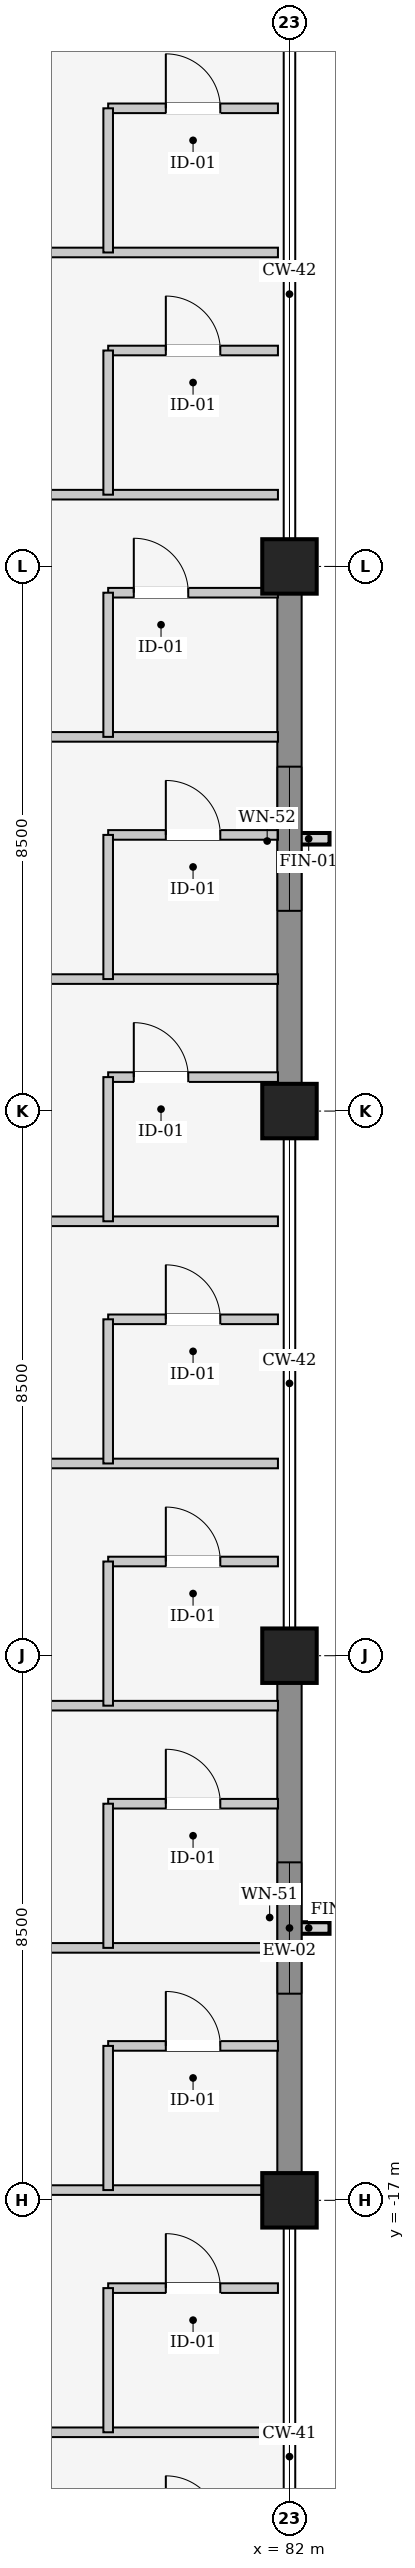
"""IFC4 building model, lengths in metres.
Left out: names, types, materials, properties, quantities, classifications, styles, units other than length and angle.
Written with IfcOpenShell. Run it as: python <this file> out.ifc"""

import sys

from ifc_helpers import new_model, si_unit, direction, frame, frame_2d, origin, origin_2d, place, context, subcontext, project, spatial, rectangle, extrude, element, fill, save


model = new_model("IFC4")
c1 = context("Model", 3, precision=1e-05, world=origin(), true_north=direction((0.0, 1.0)))
c2 = subcontext(c1, "Body", "Model", "MODEL_VIEW")
j1 = project(units=[si_unit("LENGTHUNIT", "METRE"), si_unit("PLANEANGLEUNIT", "RADIAN")], contexts=[c1])
p1 = place(None, origin())
s1 = spatial("IfcSite", under=j1, at=p1, CompositionType="ELEMENT")
p2 = place(p1, origin())
s2 = spatial("IfcBuilding", under=s1, at=p2, CompositionType="ELEMENT")
p3 = place(p2, frame((0.0, 0.0, 11.4)))
s3 = spatial("IfcBuildingStorey", under=s2, at=p3, CompositionType="ELEMENT", Elevation=11.4)
for number, where, z_axis, x_axis in (
    (1, (82.0, -17.0, 0.0), (0.0, 0.0, 1.0), (1.0, 0.0, 0.0)),
    (2, (82.0, -8.5, 0.0), (0.0, 0.0, 1.0), (1.0, 0.0, 0.0)),
    (3, (82.0, 0.0, 0.0), (0.0, 0.0, 1.0), (1.0, 0.0, 0.0)),
    (4, (82.0, 8.5, 0.0), (0.0, 0.0, 1.0), (1.0, 0.0, 0.0)),
):
    element("IfcColumn", number, at=place(p3, frame(where, z_axis=z_axis, x_axis=x_axis)), inside=s3, PredefinedType="COLUMN", context=c2, shape_type="SweptSolid", body=[
        extrude(rectangle(XDim=0.85, YDim=0.85, at=origin_2d()), origin(), (0.0, 0.0, 1.0), 4.8),
    ])
p4 = place(p3, frame((82.0, -8.907, 0.0), z_axis=(0.0, 0.0, 1.0), x_axis=(0.0, -1.0, 0.0)))
e5 = element("IfcWall", 5, at=p4, inside=s3, PredefinedType="SOLIDWALL", context=c2, shape_type="SweptSolid", body=[
    extrude(rectangle(XDim=7.686, YDim=0.38, at=frame_2d((3.843, 0.0))), origin(), (0.0, 0.0, 1.0), 3.76),
])
p5 = place(p4, frame((2.818, 0.0, 0.9)))
e6 = element("IfcOpeningElement", 6, at=p5, cuts=e5, PredefinedType="OPENING", context=c2, shape_type="SweptSolid", body=[
    extrude(rectangle(XDim=2.05, YDim=2.5, at=frame_2d((1.025, 1.25))), frame((0.0, 0.2, 0.0), z_axis=(0.0, -1.0, 0.0), x_axis=(1.0, 0.0, 0.0)), (0.0, 0.0, 1.0), 0.4),
])
p6 = place(p3, frame((82.0, 8.093, 0.0), z_axis=(0.0, 0.0, 1.0), x_axis=(0.0, -1.0, 0.0)))
e7 = element("IfcWall", 7, at=p6, inside=s3, PredefinedType="SOLIDWALL", context=c2, shape_type="SweptSolid", body=[
    extrude(rectangle(XDim=7.686, YDim=0.38, at=frame_2d((3.843, 0.0))), origin(), (0.0, 0.0, 1.0), 3.76),
])
p7 = place(p6, frame((2.718, 0.0, 0.9)))
e8 = element("IfcOpeningElement", 8, at=p7, cuts=e7, PredefinedType="OPENING", context=c2, shape_type="SweptSolid", body=[
    extrude(rectangle(XDim=2.25, YDim=2.5, at=frame_2d((1.125, 1.25))), frame((0.0, 0.2, 0.0), z_axis=(0.0, -1.0, 0.0), x_axis=(1.0, 0.0, 0.0)), (0.0, 0.0, 1.0), 0.4),
])
p8 = place(p3, frame((70.2, -20.62, 0.0), z_axis=(0.0, 0.0, 1.0), x_axis=(1.0, 0.0, 0.0)))
e9 = element("IfcWall", 9, at=p8, inside=s3, PredefinedType="PARTITIONING", context=c2, shape_type="SweptSolid", body=[
    extrude(rectangle(XDim=11.62, YDim=0.15, at=frame_2d((5.81, 0.0))), origin(), (0.0, 0.0, 1.0), 3.845),
])
p9 = place(p3, frame((79.17, -18.37, 0.0), z_axis=(0.0, 0.0, 1.0), x_axis=(1.0, 0.0, 0.0)))
e10 = element("IfcWall", 10, at=p9, inside=s3, PredefinedType="PARTITIONING", context=c2, shape_type="SweptSolid", body=[
    extrude(rectangle(XDim=2.65, YDim=0.15, at=frame_2d((1.325, 0.0))), origin(), (0.0, 0.0, 1.0), 3.845),
])
p10 = place(p9, frame((0.9, 0.0, 0.0)))
e11 = element("IfcOpeningElement", 11, at=p10, cuts=e10, PredefinedType="OPENING", context=c2, shape_type="SweptSolid", body=[
    extrude(rectangle(XDim=0.85, YDim=2.15, at=frame_2d((0.425, 1.075))), frame((0.0, 0.085, 0.0), z_axis=(0.0, -1.0, 0.0), x_axis=(1.0, 0.0, 0.0)), (0.0, 0.0, 1.0), 0.17),
])
p11 = place(p3, frame((79.17, -20.62, 0.0), z_axis=(0.0, 0.0, 1.0), x_axis=(0.0, 1.0, 0.0)))
e12 = element("IfcWall", 12, at=p11, inside=s3, PredefinedType="PARTITIONING", context=c2, shape_type="SweptSolid", body=[
    extrude(rectangle(XDim=2.25, YDim=0.15, at=frame_2d((1.125, 0.0))), origin(), (0.0, 0.0, 1.0), 4.44),
])
p12 = place(p3, frame((70.2, -16.84, 0.0), z_axis=(0.0, 0.0, 1.0), x_axis=(1.0, 0.0, 0.0)))
e13 = element("IfcWall", 13, at=p12, inside=s3, PredefinedType="PARTITIONING", context=c2, shape_type="SweptSolid", body=[
    extrude(rectangle(XDim=11.62, YDim=0.15, at=frame_2d((5.81, 0.0))), origin(), (0.0, 0.0, 1.0), 3.545),
])
p13 = place(p3, frame((79.17, -14.59, 0.0), z_axis=(0.0, 0.0, 1.0), x_axis=(1.0, 0.0, 0.0)))
e14 = element("IfcWall", 14, at=p13, inside=s3, PredefinedType="PARTITIONING", context=c2, shape_type="SweptSolid", body=[
    extrude(rectangle(XDim=2.65, YDim=0.15, at=frame_2d((1.325, 0.0))), origin(), (0.0, 0.0, 1.0), 3.845),
])
p14 = place(p13, frame((0.9, 0.0, 0.0)))
e15 = element("IfcOpeningElement", 15, at=p14, cuts=e14, PredefinedType="OPENING", context=c2, shape_type="SweptSolid", body=[
    extrude(rectangle(XDim=0.85, YDim=2.15, at=frame_2d((0.425, 1.075))), frame((0.0, 0.085, 0.0), z_axis=(0.0, -1.0, 0.0), x_axis=(1.0, 0.0, 0.0)), (0.0, 0.0, 1.0), 0.17),
])
p15 = place(p3, frame((79.17, -16.84, 0.0), z_axis=(0.0, 0.0, 1.0), x_axis=(0.0, 1.0, 0.0)))
e16 = element("IfcWall", 16, at=p15, inside=s3, PredefinedType="PARTITIONING", context=c2, shape_type="SweptSolid", body=[
    extrude(rectangle(XDim=2.25, YDim=0.15, at=frame_2d((1.125, 0.0))), origin(), (0.0, 0.0, 1.0), 3.745),
])
p16 = place(p3, frame((70.2, -13.06, 0.0), z_axis=(0.0, 0.0, 1.0), x_axis=(1.0, 0.0, 0.0)))
e17 = element("IfcWall", 17, at=p16, inside=s3, PredefinedType="PARTITIONING", context=c2, shape_type="SweptSolid", body=[
    extrude(rectangle(XDim=11.62, YDim=0.15, at=frame_2d((5.81, 0.0))), origin(), (0.0, 0.0, 1.0), 3.845),
])
p17 = place(p3, frame((79.17, -10.81, 0.0), z_axis=(0.0, 0.0, 1.0), x_axis=(1.0, 0.0, 0.0)))
e18 = element("IfcWall", 18, at=p17, inside=s3, PredefinedType="PARTITIONING", context=c2, shape_type="SweptSolid", body=[
    extrude(rectangle(XDim=2.65, YDim=0.15, at=frame_2d((1.325, 0.0))), origin(), (0.0, 0.0, 1.0), 3.845),
])
p18 = place(p17, frame((0.9, 0.0, 0.0)))
e19 = element("IfcOpeningElement", 19, at=p18, cuts=e18, PredefinedType="OPENING", context=c2, shape_type="SweptSolid", body=[
    extrude(rectangle(XDim=0.85, YDim=2.15, at=frame_2d((0.425, 1.075))), frame((0.0, 0.085, 0.0), z_axis=(0.0, -1.0, 0.0), x_axis=(1.0, 0.0, 0.0)), (0.0, 0.0, 1.0), 0.17),
])
p19 = place(p3, frame((79.17, -13.06, 0.0), z_axis=(0.0, 0.0, 1.0), x_axis=(0.0, 1.0, 0.0)))
e20 = element("IfcWall", 20, at=p19, inside=s3, PredefinedType="PARTITIONING", context=c2, shape_type="SweptSolid", body=[
    extrude(rectangle(XDim=2.25, YDim=0.15, at=frame_2d((1.125, 0.0))), origin(), (0.0, 0.0, 1.0), 4.14),
])
p20 = place(p3, frame((70.2, -9.28, 0.0), z_axis=(0.0, 0.0, 1.0), x_axis=(1.0, 0.0, 0.0)))
e21 = element("IfcWall", 21, at=p20, inside=s3, PredefinedType="PARTITIONING", context=c2, shape_type="SweptSolid", body=[
    extrude(rectangle(XDim=11.62, YDim=0.15, at=frame_2d((5.81, 0.0))), origin(), (0.0, 0.0, 1.0), 3.845),
])
p21 = place(p3, frame((79.17, -7.03, 0.0), z_axis=(0.0, 0.0, 1.0), x_axis=(1.0, 0.0, 0.0)))
e22 = element("IfcWall", 22, at=p21, inside=s3, PredefinedType="PARTITIONING", context=c2, shape_type="SweptSolid", body=[
    extrude(rectangle(XDim=2.65, YDim=0.15, at=frame_2d((1.325, 0.0))), origin(), (0.0, 0.0, 1.0), 3.845),
])
p22 = place(p21, frame((0.9, 0.0, 0.0)))
e23 = element("IfcOpeningElement", 23, at=p22, cuts=e22, PredefinedType="OPENING", context=c2, shape_type="SweptSolid", body=[
    extrude(rectangle(XDim=0.85, YDim=2.15, at=frame_2d((0.425, 1.075))), frame((0.0, 0.085, 0.0), z_axis=(0.0, -1.0, 0.0), x_axis=(1.0, 0.0, 0.0)), (0.0, 0.0, 1.0), 0.17),
])
p23 = place(p3, frame((79.17, -9.28, 0.0), z_axis=(0.0, 0.0, 1.0), x_axis=(0.0, 1.0, 0.0)))
e24 = element("IfcWall", 24, at=p23, inside=s3, PredefinedType="PARTITIONING", context=c2, shape_type="SweptSolid", body=[
    extrude(rectangle(XDim=2.25, YDim=0.15, at=frame_2d((1.125, 0.0))), origin(), (0.0, 0.0, 1.0), 3.745),
])
p24 = place(p3, frame((70.2, -5.5, 0.0), z_axis=(0.0, 0.0, 1.0), x_axis=(1.0, 0.0, 0.0)))
e25 = element("IfcWall", 25, at=p24, inside=s3, PredefinedType="PARTITIONING", context=c2, shape_type="SweptSolid", body=[
    extrude(rectangle(XDim=11.62, YDim=0.15, at=frame_2d((5.81, 0.0))), origin(), (0.0, 0.0, 1.0), 3.845),
])
p25 = place(p3, frame((79.17, -3.25, 0.0), z_axis=(0.0, 0.0, 1.0), x_axis=(1.0, 0.0, 0.0)))
e26 = element("IfcWall", 26, at=p25, inside=s3, PredefinedType="PARTITIONING", context=c2, shape_type="SweptSolid", body=[
    extrude(rectangle(XDim=2.65, YDim=0.15, at=frame_2d((1.325, 0.0))), origin(), (0.0, 0.0, 1.0), 3.845),
])
p26 = place(p25, frame((0.9, 0.0, 0.0)))
e27 = element("IfcOpeningElement", 27, at=p26, cuts=e26, PredefinedType="OPENING", context=c2, shape_type="SweptSolid", body=[
    extrude(rectangle(XDim=0.85, YDim=2.15, at=frame_2d((0.425, 1.075))), frame((0.0, 0.085, 0.0), z_axis=(0.0, -1.0, 0.0), x_axis=(1.0, 0.0, 0.0)), (0.0, 0.0, 1.0), 0.17),
])
p27 = place(p3, frame((79.17, -5.5, 0.0), z_axis=(0.0, 0.0, 1.0), x_axis=(0.0, 1.0, 0.0)))
e28 = element("IfcWall", 28, at=p27, inside=s3, PredefinedType="PARTITIONING", context=c2, shape_type="SweptSolid", body=[
    extrude(rectangle(XDim=2.25, YDim=0.15, at=frame_2d((1.125, 0.0))), origin(), (0.0, 0.0, 1.0), 4.14),
])
p28 = place(p3, frame((70.2, -1.72, 0.0), z_axis=(0.0, 0.0, 1.0), x_axis=(1.0, 0.0, 0.0)))
e29 = element("IfcWall", 29, at=p28, inside=s3, PredefinedType="PARTITIONING", context=c2, shape_type="SweptSolid", body=[
    extrude(rectangle(XDim=11.62, YDim=0.15, at=frame_2d((5.81, 0.0))), origin(), (0.0, 0.0, 1.0), 3.845),
])
p29 = place(p3, frame((79.17, 0.53, 0.0), z_axis=(0.0, 0.0, 1.0), x_axis=(1.0, 0.0, 0.0)))
e30 = element("IfcWall", 30, at=p29, inside=s3, PredefinedType="PARTITIONING", context=c2, shape_type="SweptSolid", body=[
    extrude(rectangle(XDim=2.65, YDim=0.15, at=frame_2d((1.325, 0.0))), origin(), (0.0, 0.0, 1.0), 3.845),
])
p30 = place(p29, frame((0.4, 0.0, 0.0)))
e31 = element("IfcOpeningElement", 31, at=p30, cuts=e30, PredefinedType="OPENING", context=c2, shape_type="SweptSolid", body=[
    extrude(rectangle(XDim=0.85, YDim=2.15, at=frame_2d((0.425, 1.075))), frame((0.0, 0.085, 0.0), z_axis=(0.0, -1.0, 0.0), x_axis=(1.0, 0.0, 0.0)), (0.0, 0.0, 1.0), 0.17),
])
p31 = place(p3, frame((79.17, -1.72, 0.0), z_axis=(0.0, 0.0, 1.0), x_axis=(0.0, 1.0, 0.0)))
e32 = element("IfcWall", 32, at=p31, inside=s3, PredefinedType="PARTITIONING", context=c2, shape_type="SweptSolid", body=[
    extrude(rectangle(XDim=2.25, YDim=0.15, at=frame_2d((1.125, 0.0))), origin(), (0.0, 0.0, 1.0), 3.745),
])
p32 = place(p3, frame((70.2, 2.06, 0.0), z_axis=(0.0, 0.0, 1.0), x_axis=(1.0, 0.0, 0.0)))
e33 = element("IfcWall", 33, at=p32, inside=s3, PredefinedType="PARTITIONING", context=c2, shape_type="SweptSolid", body=[
    extrude(rectangle(XDim=11.62, YDim=0.15, at=frame_2d((5.81, 0.0))), origin(), (0.0, 0.0, 1.0), 3.845),
])
p33 = place(p3, frame((79.17, 4.31, 0.0), z_axis=(0.0, 0.0, 1.0), x_axis=(1.0, 0.0, 0.0)))
e34 = element("IfcWall", 34, at=p33, inside=s3, PredefinedType="PARTITIONING", context=c2, shape_type="SweptSolid", body=[
    extrude(rectangle(XDim=2.65, YDim=0.15, at=frame_2d((1.325, 0.0))), origin(), (0.0, 0.0, 1.0), 3.845),
])
p34 = place(p33, frame((0.9, 0.0, 0.0)))
e35 = element("IfcOpeningElement", 35, at=p34, cuts=e34, PredefinedType="OPENING", context=c2, shape_type="SweptSolid", body=[
    extrude(rectangle(XDim=0.85, YDim=2.15, at=frame_2d((0.425, 1.075))), frame((0.0, 0.085, 0.0), z_axis=(0.0, -1.0, 0.0), x_axis=(1.0, 0.0, 0.0)), (0.0, 0.0, 1.0), 0.17),
])
p35 = place(p3, frame((79.17, 2.06, 0.0), z_axis=(0.0, 0.0, 1.0), x_axis=(0.0, 1.0, 0.0)))
e36 = element("IfcWall", 36, at=p35, inside=s3, PredefinedType="PARTITIONING", context=c2, shape_type="SweptSolid", body=[
    extrude(rectangle(XDim=2.25, YDim=0.15, at=frame_2d((1.125, 0.0))), origin(), (0.0, 0.0, 1.0), 4.14),
])
p36 = place(p3, frame((70.2, 5.84, 0.0), z_axis=(0.0, 0.0, 1.0), x_axis=(1.0, 0.0, 0.0)))
e37 = element("IfcWall", 37, at=p36, inside=s3, PredefinedType="PARTITIONING", context=c2, shape_type="SweptSolid", body=[
    extrude(rectangle(XDim=11.62, YDim=0.15, at=frame_2d((5.81, 0.0))), origin(), (0.0, 0.0, 1.0), 3.845),
])
p37 = place(p3, frame((79.17, 8.09, 0.0), z_axis=(0.0, 0.0, 1.0), x_axis=(1.0, 0.0, 0.0)))
e38 = element("IfcWall", 38, at=p37, inside=s3, PredefinedType="PARTITIONING", context=c2, shape_type="SweptSolid", body=[
    extrude(rectangle(XDim=2.65, YDim=0.15, at=frame_2d((1.325, 0.0))), origin(), (0.0, 0.0, 1.0), 3.745),
])
p38 = place(p37, frame((0.4, 0.0, 0.0)))
e39 = element("IfcOpeningElement", 39, at=p38, cuts=e38, PredefinedType="OPENING", context=c2, shape_type="SweptSolid", body=[
    extrude(rectangle(XDim=0.85, YDim=2.15, at=frame_2d((0.425, 1.075))), frame((0.0, 0.085, 0.0), z_axis=(0.0, -1.0, 0.0), x_axis=(1.0, 0.0, 0.0)), (0.0, 0.0, 1.0), 0.17),
])
p39 = place(p3, frame((79.17, 5.84, 0.0), z_axis=(0.0, 0.0, 1.0), x_axis=(0.0, 1.0, 0.0)))
e40 = element("IfcWall", 40, at=p39, inside=s3, PredefinedType="PARTITIONING", context=c2, shape_type="SweptSolid", body=[
    extrude(rectangle(XDim=2.25, YDim=0.15, at=frame_2d((1.125, 0.0))), origin(), (0.0, 0.0, 1.0), 3.745),
])
p40 = place(p3, frame((70.2, 9.62, 0.0), z_axis=(0.0, 0.0, 1.0), x_axis=(1.0, 0.0, 0.0)))
e41 = element("IfcWall", 41, at=p40, inside=s3, PredefinedType="PARTITIONING", context=c2, shape_type="SweptSolid", body=[
    extrude(rectangle(XDim=11.62, YDim=0.15, at=frame_2d((5.81, 0.0))), origin(), (0.0, 0.0, 1.0), 3.845),
])
p41 = place(p3, frame((79.17, 11.87, 0.0), z_axis=(0.0, 0.0, 1.0), x_axis=(1.0, 0.0, 0.0)))
e42 = element("IfcWall", 42, at=p41, inside=s3, PredefinedType="PARTITIONING", context=c2, shape_type="SweptSolid", body=[
    extrude(rectangle(XDim=2.65, YDim=0.15, at=frame_2d((1.325, 0.0))), origin(), (0.0, 0.0, 1.0), 3.845),
])
p42 = place(p41, frame((0.9, 0.0, 0.0)))
e43 = element("IfcOpeningElement", 43, at=p42, cuts=e42, PredefinedType="OPENING", context=c2, shape_type="SweptSolid", body=[
    extrude(rectangle(XDim=0.85, YDim=2.15, at=frame_2d((0.425, 1.075))), frame((0.0, 0.085, 0.0), z_axis=(0.0, -1.0, 0.0), x_axis=(1.0, 0.0, 0.0)), (0.0, 0.0, 1.0), 0.17),
])
p43 = place(p3, frame((79.17, 9.62, 0.0), z_axis=(0.0, 0.0, 1.0), x_axis=(0.0, 1.0, 0.0)))
e44 = element("IfcWall", 44, at=p43, inside=s3, PredefinedType="PARTITIONING", context=c2, shape_type="SweptSolid", body=[
    extrude(rectangle(XDim=2.25, YDim=0.15, at=frame_2d((1.125, 0.0))), origin(), (0.0, 0.0, 1.0), 4.44),
])
p44 = place(p3, frame((70.2, 13.4, 0.0), z_axis=(0.0, 0.0, 1.0), x_axis=(1.0, 0.0, 0.0)))
e45 = element("IfcWall", 45, at=p44, inside=s3, PredefinedType="PARTITIONING", context=c2, shape_type="SweptSolid", body=[
    extrude(rectangle(XDim=11.62, YDim=0.15, at=frame_2d((5.81, 0.0))), origin(), (0.0, 0.0, 1.0), 3.845),
])
p45 = place(p3, frame((79.17, 15.65, 0.0), z_axis=(0.0, 0.0, 1.0), x_axis=(1.0, 0.0, 0.0)))
e46 = element("IfcWall", 46, at=p45, inside=s3, PredefinedType="PARTITIONING", context=c2, shape_type="SweptSolid", body=[
    extrude(rectangle(XDim=2.65, YDim=0.15, at=frame_2d((1.325, 0.0))), origin(), (0.0, 0.0, 1.0), 3.845),
])
p46 = place(p45, frame((0.9, 0.0, 0.0)))
e47 = element("IfcOpeningElement", 47, at=p46, cuts=e46, PredefinedType="OPENING", context=c2, shape_type="SweptSolid", body=[
    extrude(rectangle(XDim=0.85, YDim=2.15, at=frame_2d((0.425, 1.075))), frame((0.0, 0.085, 0.0), z_axis=(0.0, -1.0, 0.0), x_axis=(1.0, 0.0, 0.0)), (0.0, 0.0, 1.0), 0.17),
])
p47 = place(p3, frame((79.17, 13.4, 0.0), z_axis=(0.0, 0.0, 1.0), x_axis=(0.0, 1.0, 0.0)))
e48 = element("IfcWall", 48, at=p47, inside=s3, PredefinedType="PARTITIONING", context=c2, shape_type="SweptSolid", body=[
    extrude(rectangle(XDim=2.25, YDim=0.15, at=frame_2d((1.125, 0.0))), origin(), (0.0, 0.0, 1.0), 4.44),
])
p48 = place(p5, origin())
e49 = element("IfcWindow", 49, at=p48, inside=s3, PartitioningType="SINGLE_PANEL", PredefinedType="WINDOW", context=c2, shape_type="SweptSolid", body=[
    extrude(rectangle(XDim=2.05, YDim=2.5, at=frame_2d((1.025, 1.25))), frame((0.0, 0.03, 0.0), z_axis=(0.0, -1.0, 0.0), x_axis=(1.0, 0.0, 0.0)), (0.0, 0.0, 1.0), 0.06),
])
fill(e6, e49)
p49 = place(p7, origin())
e50 = element("IfcWindow", 50, at=p49, inside=s3, PartitioningType="SINGLE_PANEL", PredefinedType="WINDOW", context=c2, shape_type="SweptSolid", body=[
    extrude(rectangle(XDim=2.25, YDim=2.5, at=frame_2d((1.125, 1.25))), frame((0.0, 0.03, 0.0), z_axis=(0.0, -1.0, 0.0), x_axis=(1.0, 0.0, 0.0)), (0.0, 0.0, 1.0), 0.06),
])
fill(e8, e50)
p50 = place(p10, origin())
e51 = element("IfcDoor", 51, at=p50, inside=s3, OperationType="SINGLE_SWING_LEFT", PredefinedType="DOOR", context=c2, shape_type="SweptSolid", body=[
    extrude(rectangle(XDim=0.85, YDim=2.15, at=frame_2d((0.425, 1.075))), frame((0.0, 0.025, 0.0), z_axis=(0.0, -1.0, 0.0), x_axis=(1.0, 0.0, 0.0)), (0.0, 0.0, 1.0), 0.05),
])
fill(e11, e51)
p51 = place(p14, origin())
e52 = element("IfcDoor", 52, at=p51, inside=s3, OperationType="SINGLE_SWING_LEFT", PredefinedType="DOOR", context=c2, shape_type="SweptSolid", body=[
    extrude(rectangle(XDim=0.85, YDim=2.15, at=frame_2d((0.425, 1.075))), frame((0.0, 0.025, 0.0), z_axis=(0.0, -1.0, 0.0), x_axis=(1.0, 0.0, 0.0)), (0.0, 0.0, 1.0), 0.05),
])
fill(e15, e52)
p52 = place(p18, origin())
e53 = element("IfcDoor", 53, at=p52, inside=s3, OperationType="SINGLE_SWING_LEFT", PredefinedType="DOOR", context=c2, shape_type="SweptSolid", body=[
    extrude(rectangle(XDim=0.85, YDim=2.15, at=frame_2d((0.425, 1.075))), frame((0.0, 0.025, 0.0), z_axis=(0.0, -1.0, 0.0), x_axis=(1.0, 0.0, 0.0)), (0.0, 0.0, 1.0), 0.05),
])
fill(e19, e53)
p53 = place(p22, origin())
e54 = element("IfcDoor", 54, at=p53, inside=s3, OperationType="SINGLE_SWING_LEFT", PredefinedType="DOOR", context=c2, shape_type="SweptSolid", body=[
    extrude(rectangle(XDim=0.85, YDim=2.15, at=frame_2d((0.425, 1.075))), frame((0.0, 0.025, 0.0), z_axis=(0.0, -1.0, 0.0), x_axis=(1.0, 0.0, 0.0)), (0.0, 0.0, 1.0), 0.05),
])
fill(e23, e54)
p54 = place(p26, origin())
e55 = element("IfcDoor", 55, at=p54, inside=s3, OperationType="SINGLE_SWING_LEFT", PredefinedType="DOOR", context=c2, shape_type="SweptSolid", body=[
    extrude(rectangle(XDim=0.85, YDim=2.15, at=frame_2d((0.425, 1.075))), frame((0.0, 0.025, 0.0), z_axis=(0.0, -1.0, 0.0), x_axis=(1.0, 0.0, 0.0)), (0.0, 0.0, 1.0), 0.05),
])
fill(e27, e55)
p55 = place(p30, origin())
e56 = element("IfcDoor", 56, at=p55, inside=s3, OperationType="SINGLE_SWING_LEFT", PredefinedType="DOOR", context=c2, shape_type="SweptSolid", body=[
    extrude(rectangle(XDim=0.85, YDim=2.15, at=frame_2d((0.425, 1.075))), frame((0.0, 0.025, 0.0), z_axis=(0.0, -1.0, 0.0), x_axis=(1.0, 0.0, 0.0)), (0.0, 0.0, 1.0), 0.05),
])
fill(e31, e56)
p56 = place(p34, origin())
e57 = element("IfcDoor", 57, at=p56, inside=s3, OperationType="SINGLE_SWING_LEFT", PredefinedType="DOOR", context=c2, shape_type="SweptSolid", body=[
    extrude(rectangle(XDim=0.85, YDim=2.15, at=frame_2d((0.425, 1.075))), frame((0.0, 0.025, 0.0), z_axis=(0.0, -1.0, 0.0), x_axis=(1.0, 0.0, 0.0)), (0.0, 0.0, 1.0), 0.05),
])
fill(e35, e57)
p57 = place(p38, origin())
e58 = element("IfcDoor", 58, at=p57, inside=s3, OperationType="SINGLE_SWING_LEFT", PredefinedType="DOOR", context=c2, shape_type="SweptSolid", body=[
    extrude(rectangle(XDim=0.85, YDim=2.15, at=frame_2d((0.425, 1.075))), frame((0.0, 0.025, 0.0), z_axis=(0.0, -1.0, 0.0), x_axis=(1.0, 0.0, 0.0)), (0.0, 0.0, 1.0), 0.05),
])
fill(e39, e58)
p58 = place(p42, origin())
e59 = element("IfcDoor", 59, at=p58, inside=s3, OperationType="SINGLE_SWING_LEFT", PredefinedType="DOOR", context=c2, shape_type="SweptSolid", body=[
    extrude(rectangle(XDim=0.85, YDim=2.15, at=frame_2d((0.425, 1.075))), frame((0.0, 0.025, 0.0), z_axis=(0.0, -1.0, 0.0), x_axis=(1.0, 0.0, 0.0)), (0.0, 0.0, 1.0), 0.05),
])
fill(e43, e59)
p59 = place(p46, origin())
e60 = element("IfcDoor", 60, at=p59, inside=s3, OperationType="SINGLE_SWING_LEFT", PredefinedType="DOOR", context=c2, shape_type="SweptSolid", body=[
    extrude(rectangle(XDim=0.85, YDim=2.15, at=frame_2d((0.425, 1.075))), frame((0.0, 0.025, 0.0), z_axis=(0.0, -1.0, 0.0), x_axis=(1.0, 0.0, 0.0)), (0.0, 0.0, 1.0), 0.05),
])
fill(e47, e60)
save(model, sys.argv[1])
